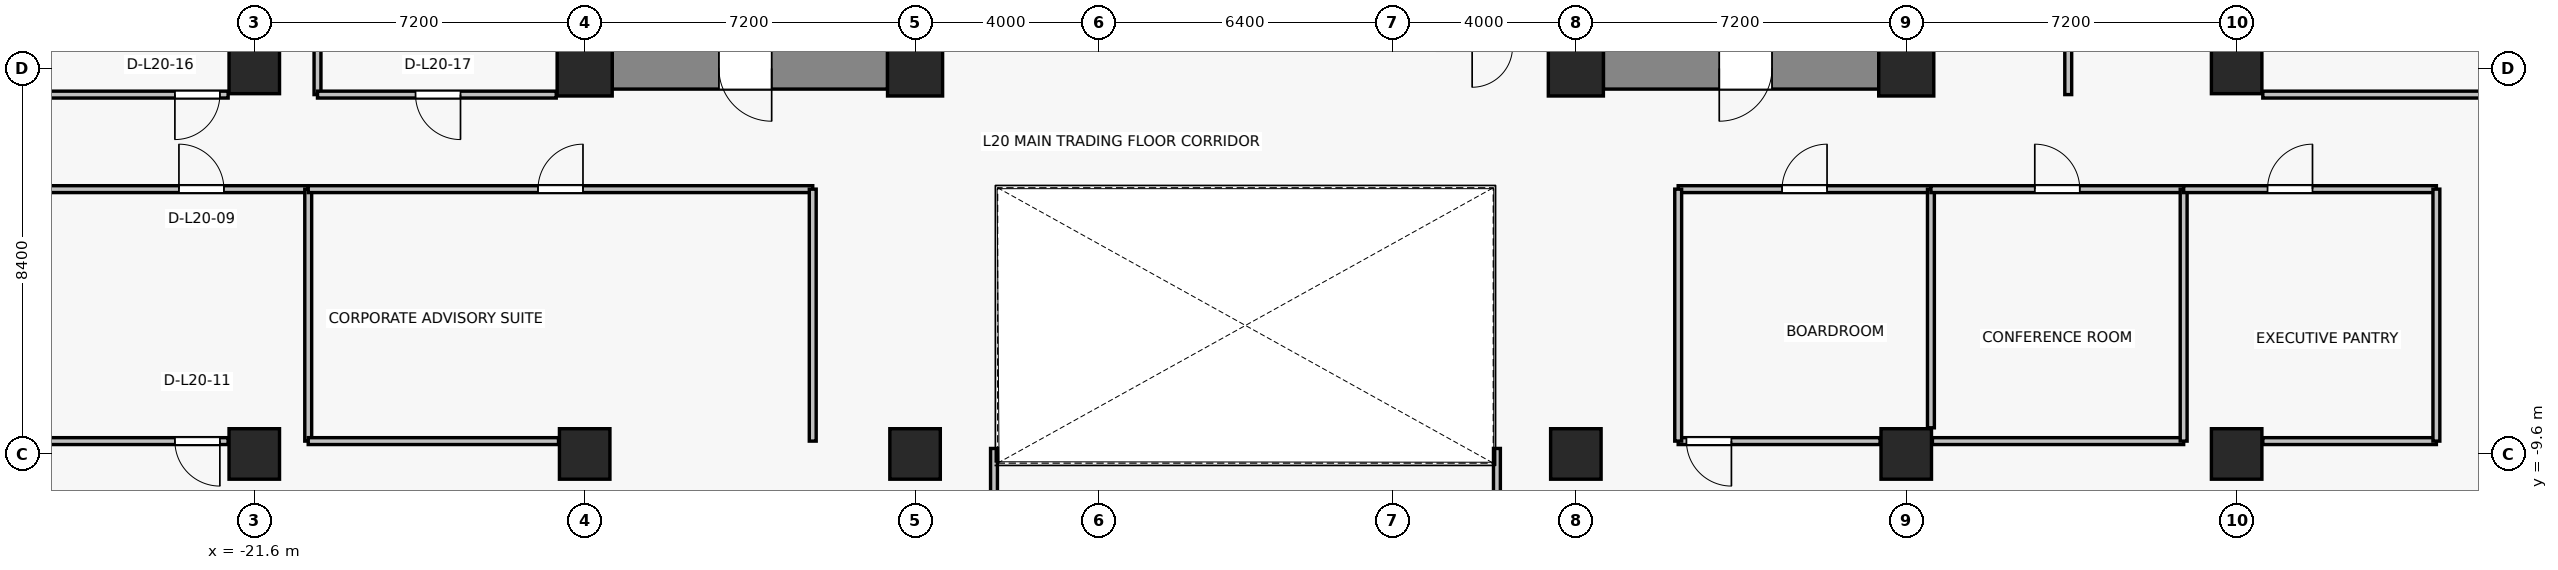
"""IFC4 building model, lengths in metres.
Left out: names, types, materials, properties, quantities, classifications, styles, units other than length and angle.
Written with IfcOpenShell. Run it as: python <this file> out.ifc"""

import sys

from ifc_helpers import new_model, si_unit, direction, frame, frame_2d, origin, origin_2d, place, context, subcontext, project, spatial, rectangle, extrude, source, transform, mapped, element, fill, save


model = new_model("IFC4")
c1 = context("Model", 3, precision=1e-05, world=origin(), true_north=direction((0.0, 1.0)))
c2 = subcontext(c1, "Body", "Model", "MODEL_VIEW")
j1 = project(units=[si_unit("LENGTHUNIT", "METRE"), si_unit("PLANEANGLEUNIT", "RADIAN")], contexts=[c1])
p1 = place(None, origin())
s1 = spatial("IfcSite", under=j1, at=p1, CompositionType="ELEMENT")
p2 = place(p1, origin())
s2 = spatial("IfcBuilding", under=s1, at=p2, CompositionType="ELEMENT")
p3 = place(p2, frame((0.0, 0.0, 73.6)))
s3 = spatial("IfcBuildingStorey", under=s2, at=p3, CompositionType="ELEMENT", Elevation=73.6)
for number, where, z_axis, x_axis in (
    (1, (-14.4, -1.2, 0.0), (0.0, 0.0, 1.0), (1.0, 0.0, 0.0)),
    (2, (-7.2, -1.2, 0.0), (0.0, 0.0, 1.0), (1.0, 0.0, 0.0)),
    (3, (7.2, -1.2, 0.0), (0.0, 0.0, 1.0), (1.0, 0.0, 0.0)),
    (4, (14.4, -1.2, 0.0), (0.0, 0.0, 1.0), (1.0, 0.0, 0.0)),
):
    element("IfcColumn", number, at=place(p3, frame(where, z_axis=z_axis, x_axis=x_axis)), inside=s3, PredefinedType="COLUMN", context=c2, shape_type="SweptSolid", body=[
        extrude(rectangle(XDim=1.2, YDim=1.2, at=origin_2d()), origin(), (0.0, 0.0, 1.0), 3.3),
    ])
for number, where, z_axis, x_axis in (
    (5, (-14.4, -9.6, 0.0), (0.0, 0.0, 1.0), (1.0, 0.0, 0.0)),
    (6, (-7.2, -9.6, 0.0), (0.0, 0.0, 1.0), (1.0, 0.0, 0.0)),
    (7, (7.2, -9.6, 0.0), (0.0, 0.0, 1.0), (1.0, 0.0, 0.0)),
    (8, (14.4, -9.6, 0.0), (0.0, 0.0, 1.0), (1.0, 0.0, 0.0)),
    (9, (-21.6, -9.6, 0.0), (0.0, 0.0, 1.0), (1.0, 0.0, 0.0)),
    (10, (-21.6, -1.2, 0.0), (0.0, 0.0, 1.0), (1.0, 0.0, 0.0)),
    (11, (21.6, -9.6, 0.0), (0.0, 0.0, 1.0), (1.0, 0.0, 0.0)),
    (12, (21.6, -1.2, 0.0), (0.0, 0.0, 1.0), (1.0, 0.0, 0.0)),
):
    element("IfcColumn", number, at=place(p3, frame(where, z_axis=z_axis, x_axis=x_axis)), inside=s3, PredefinedType="COLUMN", context=c2, shape_type="SweptSolid", body=[
        extrude(rectangle(XDim=1.1, YDim=1.1, at=origin_2d()), origin(), (0.0, 0.0, 1.0), 3.3),
    ])
p4 = place(p3, frame((-7.8, -1.2, 0.0), z_axis=(0.0, 0.0, 1.0), x_axis=(-1.0, 0.0, 0.0)))
e13 = element("IfcWall", 13, at=p4, inside=s3, PredefinedType="SHEAR", context=c2, shape_type="SweptSolid", body=[
    extrude(rectangle(XDim=6.0, YDim=0.9, at=frame_2d((3.0, 0.0))), origin(), (0.0, 0.0, 1.0), 3.075),
])
p5 = place(p4, frame((2.525, 0.0, 0.0)))
e14 = element("IfcOpeningElement", 14, at=p5, cuts=e13, PredefinedType="OPENING", context=c2, shape_type="SweptSolid", body=[
    extrude(rectangle(XDim=1.15, YDim=2.15, at=frame_2d((0.575, 1.075))), frame((0.0, 0.46, 0.0), z_axis=(0.0, -1.0, 0.0), x_axis=(1.0, 0.0, 0.0)), (0.0, 0.0, 1.0), 0.92),
])
p6 = place(p3, frame((13.8, -1.2, 0.0), z_axis=(0.0, 0.0, 1.0), x_axis=(-1.0, 0.0, 0.0)))
e15 = element("IfcWall", 15, at=p6, inside=s3, PredefinedType="SHEAR", context=c2, shape_type="SweptSolid", body=[
    extrude(rectangle(XDim=6.0, YDim=0.9, at=frame_2d((3.0, 0.0))), origin(), (0.0, 0.0, 1.0), 3.075),
])
p7 = place(p6, frame((2.325, 0.0, 0.0)))
e16 = element("IfcOpeningElement", 16, at=p7, cuts=e15, PredefinedType="OPENING", context=c2, shape_type="SweptSolid", body=[
    extrude(rectangle(XDim=1.15, YDim=2.15, at=frame_2d((0.575, 1.075))), frame((0.0, 0.46, 0.0), z_axis=(0.0, -1.0, 0.0), x_axis=(1.0, 0.0, 0.0)), (0.0, 0.0, 1.0), 0.92),
])
p8 = place(p3, frame((-22.17, -9.32, 0.0), z_axis=(0.0, 0.0, 1.0), x_axis=(-1.0, 0.0, 0.0)))
e17 = element("IfcWall", 17, at=p8, inside=s3, PredefinedType="PARTITIONING", context=c2, shape_type="SweptSolid", body=[
    extrude(rectangle(XDim=6.36, YDim=0.15, at=frame_2d((3.18, 0.0))), origin(), (0.0, 0.0, 1.0), 2.465),
])
p9 = place(p8, frame((0.18, 0.0, 0.0)))
e18 = element("IfcOpeningElement", 18, at=p9, cuts=e17, PredefinedType="OPENING", context=c2, shape_type="SweptSolid", body=[
    extrude(rectangle(XDim=0.98, YDim=2.15, at=frame_2d((0.49, 1.075))), frame((0.0, 0.085, 0.0), z_axis=(0.0, -1.0, 0.0), x_axis=(1.0, 0.0, 0.0)), (0.0, 0.0, 1.0), 0.17),
])
p10 = place(p3, frame((-28.53, -3.83, 0.0), z_axis=(0.0, 0.0, 1.0), x_axis=(1.0, 0.0, 0.0)))
e19 = element("IfcWall", 19, at=p10, inside=s3, PredefinedType="PARTITIONING", context=c2, shape_type="SweptSolid", body=[
    extrude(rectangle(XDim=8.105, YDim=0.15, at=frame_2d((4.053, 0.0))), origin(), (0.0, 0.0, 1.0), 2.465),
])
p11 = place(p10, frame((5.288, 0.0, 0.0)))
e20 = element("IfcOpeningElement", 20, at=p11, cuts=e19, PredefinedType="OPENING", context=c2, shape_type="SweptSolid", body=[
    extrude(rectangle(XDim=0.98, YDim=2.15, at=frame_2d((0.49, 1.075))), frame((0.0, 0.085, 0.0), z_axis=(0.0, -1.0, 0.0), x_axis=(1.0, 0.0, 0.0)), (0.0, 0.0, 1.0), 0.17),
])
p12 = place(p3, frame((-20.425, -3.83, 0.0), z_axis=(0.0, 0.0, 1.0), x_axis=(0.0, -1.0, 0.0)))
e21 = element("IfcWall", 21, at=p12, inside=s3, PredefinedType="PARTITIONING", context=c2, shape_type="SweptSolid", body=[
    extrude(rectangle(XDim=5.49, YDim=0.15, at=frame_2d((2.745, 0.0))), origin(), (0.0, 0.0, 1.0), 2.465),
])
p13 = place(p3, frame((-14.97, -9.32, 0.0), z_axis=(0.0, 0.0, 1.0), x_axis=(-1.0, 0.0, 0.0)))
e22 = element("IfcWall", 22, at=p13, inside=s3, PredefinedType="PARTITIONING", context=c2, shape_type="SweptSolid", body=[
    extrude(rectangle(XDim=5.455, YDim=0.15, at=frame_2d((2.727, 0.0))), origin(), (0.0, 0.0, 1.0), 2.465),
])
p14 = place(p3, frame((-20.425, -3.83, 0.0), z_axis=(0.0, 0.0, 1.0), x_axis=(1.0, 0.0, 0.0)))
e23 = element("IfcWall", 23, at=p14, inside=s3, PredefinedType="PARTITIONING", context=c2, shape_type="SweptSolid", body=[
    extrude(rectangle(XDim=10.995, YDim=0.15, at=frame_2d((5.497, 0.0))), origin(), (0.0, 0.0, 1.0), 2.465),
])
p15 = place(p14, frame((5.008, 0.0, 0.0)))
e24 = element("IfcOpeningElement", 24, at=p15, cuts=e23, PredefinedType="OPENING", context=c2, shape_type="SweptSolid", body=[
    extrude(rectangle(XDim=0.98, YDim=2.15, at=frame_2d((0.49, 1.075))), frame((0.0, 0.085, 0.0), z_axis=(0.0, -1.0, 0.0), x_axis=(1.0, 0.0, 0.0)), (0.0, 0.0, 1.0), 0.17),
])
p16 = place(p3, frame((-9.43, -3.83, 0.0), z_axis=(0.0, 0.0, 1.0), x_axis=(0.0, -1.0, 0.0)))
e25 = element("IfcWall", 25, at=p16, inside=s3, PredefinedType="PARTITIONING", context=c2, shape_type="SweptSolid", body=[
    extrude(rectangle(XDim=5.49, YDim=0.15, at=frame_2d((2.745, 0.0))), origin(), (0.0, 0.0, 1.0), 2.465),
])
p17 = place(p3, frame((-5.48, -9.48, 0.0), z_axis=(0.0, 0.0, 1.0), x_axis=(0.0, -1.0, 0.0)))
e26 = element("IfcWall", 26, at=p17, inside=s3, PredefinedType="PARTITIONING", context=c2, shape_type="SweptSolid", body=[
    extrude(rectangle(XDim=8.65, YDim=0.15, at=frame_2d((4.325, 0.0))), origin(), (0.0, 0.0, 1.0), 2.465),
])
p18 = place(p3, frame((13.83, -9.32, 0.0), z_axis=(0.0, 0.0, 1.0), x_axis=(-1.0, 0.0, 0.0)))
e27 = element("IfcWall", 27, at=p18, inside=s3, PredefinedType="PARTITIONING", context=c2, shape_type="SweptSolid", body=[
    extrude(rectangle(XDim=4.4, YDim=0.15, at=frame_2d((2.2, 0.0))), origin(), (0.0, 0.0, 1.0), 2.465),
])
p19 = place(p18, frame((3.24, 0.0, 0.0)))
e28 = element("IfcOpeningElement", 28, at=p19, cuts=e27, PredefinedType="OPENING", context=c2, shape_type="SweptSolid", body=[
    extrude(rectangle(XDim=0.98, YDim=2.15, at=frame_2d((0.49, 1.075))), frame((0.0, 0.085, 0.0), z_axis=(0.0, -1.0, 0.0), x_axis=(1.0, 0.0, 0.0)), (0.0, 0.0, 1.0), 0.17),
])
p20 = place(p3, frame((9.43, -3.83, 0.0), z_axis=(0.0, 0.0, 1.0), x_axis=(1.0, 0.0, 0.0)))
e29 = element("IfcWall", 29, at=p20, inside=s3, PredefinedType="PARTITIONING", context=c2, shape_type="SweptSolid", body=[
    extrude(rectangle(XDim=5.508, YDim=0.15, at=frame_2d((2.754, 0.0))), origin(), (0.0, 0.0, 1.0), 2.465),
])
p21 = place(p20, frame((2.264, 0.0, 0.0)))
e30 = element("IfcOpeningElement", 30, at=p21, cuts=e29, PredefinedType="OPENING", context=c2, shape_type="SweptSolid", body=[
    extrude(rectangle(XDim=0.98, YDim=2.15, at=frame_2d((0.49, 1.075))), frame((0.0, 0.085, 0.0), z_axis=(0.0, -1.0, 0.0), x_axis=(1.0, 0.0, 0.0)), (0.0, 0.0, 1.0), 0.17),
])
p22 = place(p3, frame((9.43, -9.32, 0.0), z_axis=(0.0, 0.0, 1.0), x_axis=(0.0, 1.0, 0.0)))
e31 = element("IfcWall", 31, at=p22, inside=s3, PredefinedType="PARTITIONING", context=c2, shape_type="SweptSolid", body=[
    extrude(rectangle(XDim=5.49, YDim=0.15, at=frame_2d((2.745, 0.0))), origin(), (0.0, 0.0, 1.0), 2.465),
])
p23 = place(p3, frame((14.938, -3.83, 0.0), z_axis=(0.0, 0.0, 1.0), x_axis=(0.0, -1.0, 0.0)))
e32 = element("IfcWall", 32, at=p23, inside=s3, PredefinedType="PARTITIONING", context=c2, shape_type="SweptSolid", body=[
    extrude(rectangle(XDim=5.2, YDim=0.15, at=frame_2d((2.6, 0.0))), origin(), (0.0, 0.0, 1.0), 2.565),
])
p24 = place(p3, frame((20.445, -9.32, 0.0), z_axis=(0.0, 0.0, 1.0), x_axis=(-1.0, 0.0, 0.0)))
e33 = element("IfcWall", 33, at=p24, inside=s3, PredefinedType="PARTITIONING", context=c2, shape_type="SweptSolid", body=[
    extrude(rectangle(XDim=5.475, YDim=0.15, at=frame_2d((2.738, 0.0))), origin(), (0.0, 0.0, 1.0), 2.465),
])
p25 = place(p3, frame((14.938, -3.83, 0.0), z_axis=(0.0, 0.0, 1.0), x_axis=(1.0, 0.0, 0.0)))
e34 = element("IfcWall", 34, at=p25, inside=s3, PredefinedType="PARTITIONING", context=c2, shape_type="SweptSolid", body=[
    extrude(rectangle(XDim=5.508, YDim=0.15, at=frame_2d((2.754, 0.0))), origin(), (0.0, 0.0, 1.0), 3.075),
])
p26 = place(p25, frame((2.263, 0.0, 0.0)))
e35 = element("IfcOpeningElement", 35, at=p26, cuts=e34, PredefinedType="OPENING", context=c2, shape_type="SweptSolid", body=[
    extrude(rectangle(XDim=0.98, YDim=2.15, at=frame_2d((0.49, 1.075))), frame((0.0, 0.085, 0.0), z_axis=(0.0, -1.0, 0.0), x_axis=(1.0, 0.0, 0.0)), (0.0, 0.0, 1.0), 0.17),
])
p27 = place(p3, frame((20.445, -3.83, 0.0), z_axis=(0.0, 0.0, 1.0), x_axis=(0.0, -1.0, 0.0)))
e36 = element("IfcWall", 36, at=p27, inside=s3, PredefinedType="PARTITIONING", context=c2, shape_type="SweptSolid", body=[
    extrude(rectangle(XDim=5.49, YDim=0.15, at=frame_2d((2.745, 0.0))), origin(), (0.0, 0.0, 1.0), 2.465),
])
p28 = place(p3, frame((25.953, -9.32, 0.0), z_axis=(0.0, 0.0, 1.0), x_axis=(-1.0, 0.0, 0.0)))
e37 = element("IfcWall", 37, at=p28, inside=s3, PredefinedType="PARTITIONING", context=c2, shape_type="SweptSolid", body=[
    extrude(rectangle(XDim=3.783, YDim=0.15, at=frame_2d((1.892, 0.0))), origin(), (0.0, 0.0, 1.0), 2.465),
])
p29 = place(p3, frame((20.445, -3.83, 0.0), z_axis=(0.0, 0.0, 1.0), x_axis=(1.0, 0.0, 0.0)))
e38 = element("IfcWall", 38, at=p29, inside=s3, PredefinedType="PARTITIONING", context=c2, shape_type="SweptSolid", body=[
    extrude(rectangle(XDim=5.508, YDim=0.15, at=frame_2d((2.754, 0.0))), origin(), (0.0, 0.0, 1.0), 2.465),
])
p30 = place(p29, frame((1.828, 0.0, 0.0)))
e39 = element("IfcOpeningElement", 39, at=p30, cuts=e38, PredefinedType="OPENING", context=c2, shape_type="SweptSolid", body=[
    extrude(rectangle(XDim=0.98, YDim=2.15, at=frame_2d((0.49, 1.075))), frame((0.0, 0.085, 0.0), z_axis=(0.0, -1.0, 0.0), x_axis=(1.0, 0.0, 0.0)), (0.0, 0.0, 1.0), 0.17),
])
p31 = place(p3, frame((25.953, -3.83, 0.0), z_axis=(0.0, 0.0, 1.0), x_axis=(0.0, -1.0, 0.0)))
e40 = element("IfcWall", 40, at=p31, inside=s3, PredefinedType="PARTITIONING", context=c2, shape_type="SweptSolid", body=[
    extrude(rectangle(XDim=5.49, YDim=0.15, at=frame_2d((2.745, 0.0))), origin(), (0.0, 0.0, 1.0), 2.465),
])
p32 = place(p3, frame((5.48, -18.13, 0.0), z_axis=(0.0, 0.0, 1.0), x_axis=(0.0, 1.0, 0.0)))
e41 = element("IfcWall", 41, at=p32, inside=s3, PredefinedType="PARTITIONING", context=c2, shape_type="SweptSolid", body=[
    extrude(rectangle(XDim=8.65, YDim=0.15, at=frame_2d((4.325, 0.0))), origin(), (0.0, 0.0, 1.0), 2.465),
])
p33 = place(p3, frame((-22.17, -1.77, 0.0), z_axis=(0.0, 0.0, 1.0), x_axis=(-1.0, 0.0, 0.0)))
e42 = element("IfcWall", 42, at=p33, inside=s3, PredefinedType="PARTITIONING", context=c2, shape_type="SweptSolid", body=[
    extrude(rectangle(XDim=6.36, YDim=0.15, at=frame_2d((3.18, 0.0))), origin(), (0.0, 0.0, 1.0), 2.465),
])
p34 = place(p33, frame((0.18, 0.0, 0.0)))
e43 = element("IfcOpeningElement", 43, at=p34, cuts=e42, PredefinedType="OPENING", context=c2, shape_type="SweptSolid", body=[
    extrude(rectangle(XDim=0.98, YDim=2.15, at=frame_2d((0.49, 1.075))), frame((0.0, 0.085, 0.0), z_axis=(0.0, -1.0, 0.0), x_axis=(1.0, 0.0, 0.0)), (0.0, 0.0, 1.0), 0.17),
])
p35 = place(p3, frame((-20.222, 13.88, 0.0), z_axis=(0.0, 0.0, 1.0), x_axis=(0.0, -1.0, 0.0)))
e44 = element("IfcWall", 44, at=p35, inside=s3, PredefinedType="PARTITIONING", context=c2, shape_type="SweptSolid", body=[
    extrude(rectangle(XDim=15.65, YDim=0.15, at=frame_2d((7.825, 0.0))), origin(), (0.0, 0.0, 1.0), 2.465),
])
p36 = place(p3, frame((-15.02, -1.77, 0.0), z_axis=(0.0, 0.0, 1.0), x_axis=(-1.0, 0.0, 0.0)))
e45 = element("IfcWall", 45, at=p36, inside=s3, PredefinedType="PARTITIONING", context=c2, shape_type="SweptSolid", body=[
    extrude(rectangle(XDim=5.202, YDim=0.15, at=frame_2d((2.601, 0.0))), origin(), (0.0, 0.0, 1.0), 3.075),
])
p37 = place(p36, frame((2.086, 0.0, 0.0)))
e46 = element("IfcOpeningElement", 46, at=p37, cuts=e45, PredefinedType="OPENING", context=c2, shape_type="SweptSolid", body=[
    extrude(rectangle(XDim=0.98, YDim=2.15, at=frame_2d((0.49, 1.075))), frame((0.0, 0.085, 0.0), z_axis=(0.0, -1.0, 0.0), x_axis=(1.0, 0.0, 0.0)), (0.0, 0.0, 1.0), 0.17),
])
p38 = place(p3, frame((32.53, -1.77, 0.0), z_axis=(0.0, 0.0, 1.0), x_axis=(-1.0, 0.0, 0.0)))
e47 = element("IfcWall", 47, at=p38, inside=s3, PredefinedType="PARTITIONING", context=c2, shape_type="SweptSolid", body=[
    extrude(rectangle(XDim=10.36, YDim=0.15, at=frame_2d((5.18, 0.0))), origin(), (0.0, 0.0, 1.0), 2.465),
])
p39 = place(p3, frame((17.93, -1.77, 0.0), z_axis=(0.0, 0.0, 1.0), x_axis=(0.0, 1.0, 0.0)))
e48 = element("IfcWall", 48, at=p39, inside=s3, PredefinedType="PARTITIONING", context=c2, shape_type="SweptSolid", body=[
    extrude(rectangle(XDim=3.821, YDim=0.15, at=frame_2d((1.911, 0.0))), origin(), (0.0, 0.0, 1.0), 2.465),
])
p40 = place(p39, frame((1.421, 0.0, 0.0)))
e49 = element("IfcOpeningElement", 49, at=p40, cuts=e48, PredefinedType="OPENING", context=c2, shape_type="SweptSolid", body=[
    extrude(rectangle(XDim=0.98, YDim=2.15, at=frame_2d((0.49, 1.075))), frame((0.0, 0.085, 0.0), z_axis=(0.0, -1.0, 0.0), x_axis=(1.0, 0.0, 0.0)), (0.0, 0.0, 1.0), 0.17),
])
m1 = source(origin(), c2, "Body", "SweptSolid", [
    extrude(rectangle(XDim=1.15, YDim=2.15, at=frame_2d((0.575, 1.075))), frame((0.0, 0.025, 0.0), z_axis=(0.0, -1.0, 0.0), x_axis=(1.0, 0.0, 0.0)), (0.0, 0.0, 1.0), 0.05),
])
p41 = place(p5, origin())
e50 = element("IfcDoor", 50, at=p41, inside=s3, OperationType="SINGLE_SWING_LEFT", PredefinedType="DOOR", context=c2, shape_type="MappedRepresentation", body=[
    mapped(m1, transform((0.0, 0.0, 0.0), x_axis=(1.0, 0.0, 0.0), y_axis=(0.0, 1.0, 0.0), z_axis=(0.0, 0.0, 1.0), scale=1.0)),
])
fill(e14, e50)
p42 = place(p7, origin())
e51 = element("IfcDoor", 51, at=p42, inside=s3, OperationType="SINGLE_SWING_RIGHT", PredefinedType="DOOR", context=c2, shape_type="MappedRepresentation", body=[
    mapped(m1, transform((0.0, 0.0, 0.0), x_axis=(1.0, 0.0, 0.0), y_axis=(0.0, 1.0, 0.0), z_axis=(0.0, 0.0, 1.0), scale=1.0)),
])
fill(e16, e51)
m2 = source(origin(), c2, "Body", "SweptSolid", [
    extrude(rectangle(XDim=0.98, YDim=2.15, at=frame_2d((0.49, 1.075))), frame((0.0, 0.025, 0.0), z_axis=(0.0, -1.0, 0.0), x_axis=(1.0, 0.0, 0.0)), (0.0, 0.0, 1.0), 0.05),
])
p43 = place(p11, origin())
e52 = element("IfcDoor", 52, at=p43, inside=s3, OperationType="SINGLE_SWING_LEFT", PredefinedType="DOOR", context=c2, shape_type="MappedRepresentation", body=[
    mapped(m2, transform((0.0, 0.0, 0.0), x_axis=(1.0, 0.0, 0.0), y_axis=(0.0, 1.0, 0.0), z_axis=(0.0, 0.0, 1.0), scale=1.0)),
])
fill(e20, e52)
p44 = place(p15, origin())
e53 = element("IfcDoor", 53, at=p44, inside=s3, OperationType="SINGLE_SWING_RIGHT", PredefinedType="DOOR", context=c2, shape_type="MappedRepresentation", body=[
    mapped(m2, transform((0.0, 0.0, 0.0), x_axis=(1.0, 0.0, 0.0), y_axis=(0.0, 1.0, 0.0), z_axis=(0.0, 0.0, 1.0), scale=1.0)),
])
fill(e24, e53)
p45 = place(p9, origin())
e54 = element("IfcDoor", 54, at=p45, inside=s3, OperationType="SINGLE_SWING_LEFT", PredefinedType="DOOR", context=c2, shape_type="MappedRepresentation", body=[
    mapped(m2, transform((0.0, 0.0, 0.0), x_axis=(1.0, 0.0, 0.0), y_axis=(0.0, 1.0, 0.0), z_axis=(0.0, 0.0, 1.0), scale=1.0)),
])
fill(e18, e54)
p46 = place(p21, origin())
e55 = element("IfcDoor", 55, at=p46, inside=s3, OperationType="SINGLE_SWING_RIGHT", PredefinedType="DOOR", context=c2, shape_type="MappedRepresentation", body=[
    mapped(m2, transform((0.0, 0.0, 0.0), x_axis=(1.0, 0.0, 0.0), y_axis=(0.0, 1.0, 0.0), z_axis=(0.0, 0.0, 1.0), scale=1.0)),
])
fill(e30, e55)
p47 = place(p26, origin())
e56 = element("IfcDoor", 56, at=p47, inside=s3, OperationType="SINGLE_SWING_LEFT", PredefinedType="DOOR", context=c2, shape_type="MappedRepresentation", body=[
    mapped(m2, transform((0.0, 0.0, 0.0), x_axis=(1.0, 0.0, 0.0), y_axis=(0.0, 1.0, 0.0), z_axis=(0.0, 0.0, 1.0), scale=1.0)),
])
fill(e35, e56)
p48 = place(p30, origin())
e57 = element("IfcDoor", 57, at=p48, inside=s3, OperationType="SINGLE_SWING_RIGHT", PredefinedType="DOOR", context=c2, shape_type="MappedRepresentation", body=[
    mapped(m2, transform((0.0, 0.0, 0.0), x_axis=(1.0, 0.0, 0.0), y_axis=(0.0, 1.0, 0.0), z_axis=(0.0, 0.0, 1.0), scale=1.0)),
])
fill(e39, e57)
p49 = place(p19, origin())
e58 = element("IfcDoor", 58, at=p49, inside=s3, OperationType="SINGLE_SWING_LEFT", PredefinedType="DOOR", context=c2, shape_type="MappedRepresentation", body=[
    mapped(m2, transform((0.0, 0.0, 0.0), x_axis=(1.0, 0.0, 0.0), y_axis=(0.0, 1.0, 0.0), z_axis=(0.0, 0.0, 1.0), scale=1.0)),
])
fill(e28, e58)
p50 = place(p34, origin())
e59 = element("IfcDoor", 59, at=p50, inside=s3, OperationType="SINGLE_SWING_RIGHT", PredefinedType="DOOR", context=c2, shape_type="MappedRepresentation", body=[
    mapped(m2, transform((0.0, 0.0, 0.0), x_axis=(1.0, 0.0, 0.0), y_axis=(0.0, 1.0, 0.0), z_axis=(0.0, 0.0, 1.0), scale=1.0)),
])
fill(e43, e59)
p51 = place(p37, origin())
e60 = element("IfcDoor", 60, at=p51, inside=s3, OperationType="SINGLE_SWING_LEFT", PredefinedType="DOOR", context=c2, shape_type="MappedRepresentation", body=[
    mapped(m2, transform((0.0, 0.0, 0.0), x_axis=(1.0, 0.0, 0.0), y_axis=(0.0, 1.0, 0.0), z_axis=(0.0, 0.0, 1.0), scale=1.0)),
])
fill(e46, e60)
save(model, sys.argv[1])
